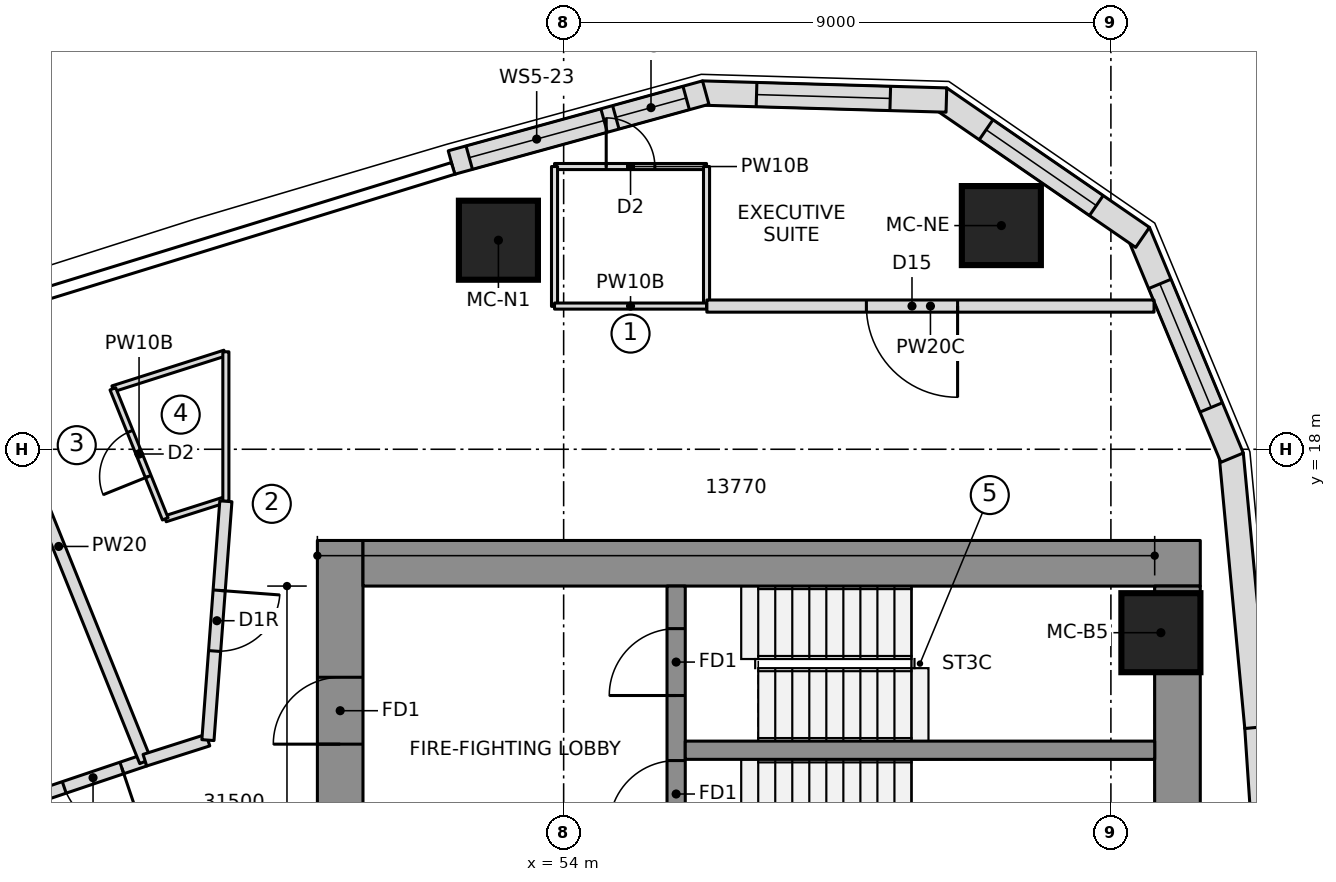
"""IFC4 building model, lengths in metres.
Left out: names, types, materials, properties, quantities, classifications, styles, units other than length and angle.
Written with IfcOpenShell. Run it as: python <this file> out.ifc"""

import sys

from ifc_helpers import new_model, si_unit, direction, frame, frame_2d, origin, origin_2d, place, context, subcontext, project, spatial, polyline, rectangle, outline, extrude, element, fill, save


model = new_model("IFC4")
c1 = context("Model", 3, precision=1e-05, world=origin(), true_north=direction((0.0, 1.0)))
c2 = subcontext(c1, "Body", "Model", "MODEL_VIEW")
j1 = project(units=[si_unit("LENGTHUNIT", "METRE"), si_unit("PLANEANGLEUNIT", "RADIAN")], contexts=[c1])
p1 = place(None, origin())
s1 = spatial("IfcSite", under=j1, at=p1, CompositionType="ELEMENT")
p2 = place(p1, origin())
s2 = spatial("IfcBuilding", under=s1, at=p2, CompositionType="ELEMENT")
p3 = place(p2, frame((0.0, 0.0, 207.45)))
s3 = spatial("IfcBuildingStorey", under=s2, at=p3, CompositionType="ELEMENT", Elevation=207.45)
p4 = place(p3, frame((50.325, 6.65, 0.0), z_axis=(0.0, 0.0, 1.0), x_axis=(0.0, 1.0, 0.0)))
e1 = element("IfcWall", 1, at=p4, inside=s3, PredefinedType="SHEAR", context=c2, shape_type="SweptSolid", body=[
    extrude(rectangle(XDim=9.85, YDim=0.75, at=frame_2d((4.925, 0.0))), origin(), (0.0, 0.0, 1.0), 3.55),
])
p5 = place(p4, frame((6.5, 0.0, 0.0)))
e2 = element("IfcOpeningElement", 2, at=p5, cuts=e1, PredefinedType="OPENING", context=c2, shape_type="SweptSolid", body=[
    extrude(rectangle(XDim=1.1, YDim=2.1, at=frame_2d((0.55, 1.05))), frame((0.0, 0.385, 0.0), z_axis=(0.0, -1.0, 0.0), x_axis=(1.0, 0.0, 0.0)), (0.0, 0.0, 1.0), 0.77),
])
p6 = place(p3, frame((50.7, 16.125, 0.0), z_axis=(0.0, 0.0, 1.0), x_axis=(1.0, 0.0, 0.0)))
e3 = element("IfcWall", 3, at=p6, inside=s3, PredefinedType="SHEAR", context=c2, shape_type="SweptSolid", body=[
    extrude(rectangle(XDim=13.77, YDim=0.75, at=frame_2d((6.885, 0.0))), origin(), (0.0, 0.0, 1.0), 3.55),
])
p7 = place(p3, frame((64.095, 8.099, 0.0), z_axis=(0.0, 0.0, 1.0), x_axis=(0.0, 1.0, 0.0)))
e4 = element("IfcWall", 4, at=p7, inside=s3, PredefinedType="SHEAR", context=c2, shape_type="SweptSolid", body=[
    extrude(rectangle(XDim=7.651, YDim=0.75, at=frame_2d((3.825, 0.0))), origin(), (0.0, 0.0, 1.0), 3.55),
])
p8 = place(p3, frame((55.85, 10.35, 0.0), z_axis=(0.0, 0.0, 1.0), x_axis=(0.0, 1.0, 0.0)))
e5 = element("IfcWall", 5, at=p8, inside=s3, PredefinedType="SHEAR", context=c2, shape_type="SweptSolid", body=[
    extrude(rectangle(XDim=5.4, YDim=0.3, at=frame_2d((2.7, 0.0))), origin(), (0.0, 0.0, 1.0), 3.55),
])
p9 = place(p8, frame((1.43, 0.0, 0.0)))
e6 = element("IfcOpeningElement", 6, at=p9, cuts=e5, PredefinedType="OPENING", context=c2, shape_type="SweptSolid", body=[
    extrude(rectangle(XDim=1.1, YDim=2.1, at=frame_2d((0.55, 1.05))), frame((0.0, 0.16, 0.0), z_axis=(0.0, -1.0, 0.0), x_axis=(1.0, 0.0, 0.0)), (0.0, 0.0, 1.0), 0.32),
])
p10 = place(p8, frame((3.6, 0.0, 0.0)))
e7 = element("IfcOpeningElement", 7, at=p10, cuts=e5, PredefinedType="OPENING", context=c2, shape_type="SweptSolid", body=[
    extrude(rectangle(XDim=1.1, YDim=2.1, at=frame_2d((0.55, 1.05))), frame((0.0, 0.16, 0.0), z_axis=(0.0, -1.0, 0.0), x_axis=(1.0, 0.0, 0.0)), (0.0, 0.0, 1.0), 0.32),
])
p11 = place(p3, frame((56.0, 13.05, 0.0), z_axis=(0.0, 0.0, 1.0), x_axis=(1.0, 0.0, 0.0)))
e8 = element("IfcWall", 8, at=p11, inside=s3, PredefinedType="SHEAR", context=c2, shape_type="SweptSolid", body=[
    extrude(rectangle(XDim=7.72, YDim=0.3, at=frame_2d((3.86, 0.0))), origin(), (0.0, 0.0, 1.0), 3.55),
])
for number, where, z_axis, x_axis in (
    (9, (63.822, 14.983, 0.0), (0.0, 0.0, 1.0), (1.0, 0.0, 0.0)),
    (10, (61.198, 21.679, 0.0), (0.0, 0.0, 1.0), (1.0, 0.0, 0.0)),
    (11, (52.927, 21.438, 0.0), (0.0, 0.0, 1.0), (1.0, 0.0, 0.0)),
):
    element("IfcColumn", number, at=place(p3, frame(where, z_axis=z_axis, x_axis=x_axis)), inside=s3, PredefinedType="COLUMN", context=c2, shape_type="SweptSolid", body=[
        extrude(rectangle(XDim=1.3, YDim=1.3, at=origin_2d()), origin(), (0.0, 0.0, 1.0), 3.55),
    ])
p12 = place(p3, frame((65.7, 8.958, 0.0), z_axis=(0.0, 0.0, 1.0), x_axis=(-0.066905935948, 0.997759287471, 0.0)))
e12 = element("IfcWall", 12, at=p12, inside=s3, PredefinedType="NOTDEFINED", context=c2, shape_type="SweptSolid", body=[
    extrude(outline(polyline([(-0.003, -0.2), (4.484, -0.2), (4.478, 0.2), (0.003, 0.2), (-0.003, -0.2)])), origin(), (0.0, 0.0, 1.0), 3.25),
])
p13 = place(p3, frame((65.401, 13.429, 0.0), z_axis=(0.0, 0.0, 1.0), x_axis=(-0.093605694738, 0.995609348044, 0.0)))
e13 = element("IfcWall", 13, at=p13, inside=s3, PredefinedType="NOTDEFINED", context=c2, shape_type="SweptSolid", body=[
    extrude(outline(polyline([(-0.003, -0.2), (4.511, -0.2), (4.451, 0.2), (0.003, 0.2), (-0.003, -0.2)])), origin(), (0.0, 0.0, 1.0), 3.25),
])
p14 = place(p3, frame((64.981, 17.89, 0.0), z_axis=(0.0, 0.0, 1.0), x_axis=(-0.383997619794, 0.923334082547, 0.0)))
e14 = element("IfcWall", 14, at=p14, inside=s3, PredefinedType="NOTDEFINED", context=c2, shape_type="SweptSolid", body=[
    extrude(outline(polyline([(-0.03, -0.2), (3.988, -0.2), (3.87, 0.2), (0.03, 0.2), (-0.03, -0.2)])), origin(), (0.0, 0.0, 1.0), 3.25),
])
p15 = place(p14, frame((0.865, 0.0, 0.6)))
e15 = element("IfcOpeningElement", 15, at=p15, cuts=e14, PredefinedType="OPENING", context=c2, shape_type="SweptSolid", body=[
    extrude(outline(polyline([(0.0, 1.35), (0.084, 1.771), (0.322, 2.128), (0.679, 2.366), (1.1, 2.45), (1.521, 2.366), (1.878, 2.128), (2.116, 1.771), (2.2, 1.35), (2.2, 1.1), (2.116, 0.679), (1.878, 0.322), (1.521, 0.084), (1.1, 0.0), (0.679, 0.084), (0.322, 0.322), (0.084, 0.679), (0.0, 1.1), (0.0, 1.35)])), frame((0.0, 0.21, 0.0), z_axis=(0.0, -1.0, 0.0), x_axis=(1.0, 0.0, 0.0)), (0.0, 0.0, 1.0), 0.42),
])
p16 = place(p3, frame((63.472, 21.518, 0.0), z_axis=(0.0, 0.0, 1.0), x_axis=(-0.823806162588, 0.566871596115, 0.0)))
e16 = element("IfcWall", 16, at=p16, inside=s3, PredefinedType="NOTDEFINED", context=c2, shape_type="SweptSolid", body=[
    extrude(outline(polyline([(-0.059, -0.2), (3.988, -0.2), (3.87, 0.2), (0.059, 0.2), (-0.059, -0.2)])), origin(), (0.0, 0.0, 1.0), 3.25),
])
p17 = place(p16, frame((0.865, 0.0, 0.6)))
e17 = element("IfcOpeningElement", 17, at=p17, cuts=e16, PredefinedType="OPENING", context=c2, shape_type="SweptSolid", body=[
    extrude(outline(polyline([(0.0, 1.35), (0.084, 1.771), (0.322, 2.128), (0.679, 2.366), (1.1, 2.45), (1.521, 2.366), (1.878, 2.128), (2.116, 1.771), (2.2, 1.35), (2.2, 1.1), (2.116, 0.679), (1.878, 0.322), (1.521, 0.084), (1.1, 0.0), (0.679, 0.084), (0.322, 0.322), (0.084, 0.679), (0.0, 1.1), (0.0, 1.35)])), frame((0.0, 0.21, 0.0), z_axis=(0.0, -1.0, 0.0), x_axis=(1.0, 0.0, 0.0)), (0.0, 0.0, 1.0), 0.42),
])
p18 = place(p3, frame((60.236, 23.745, 0.0), z_axis=(0.0, 0.0, 1.0), x_axis=(-0.999587920197, 0.028705222472, 0.0)))
e18 = element("IfcWall", 18, at=p18, inside=s3, PredefinedType="NOTDEFINED", context=c2, shape_type="SweptSolid", body=[
    extrude(outline(polyline([(-0.059, -0.2), (3.959, -0.2), (3.9, 0.2), (0.059, 0.2), (-0.059, -0.2)])), origin(), (0.0, 0.0, 1.0), 3.25),
])
p19 = place(p18, frame((0.865, 0.0, 0.6)))
e19 = element("IfcOpeningElement", 19, at=p19, cuts=e18, PredefinedType="OPENING", context=c2, shape_type="SweptSolid", body=[
    extrude(outline(polyline([(0.0, 1.35), (0.084, 1.771), (0.322, 2.128), (0.679, 2.366), (1.1, 2.45), (1.521, 2.366), (1.878, 2.128), (2.116, 1.771), (2.2, 1.35), (2.2, 1.1), (2.116, 0.679), (1.878, 0.322), (1.521, 0.084), (1.1, 0.0), (0.679, 0.084), (0.322, 0.322), (0.084, 0.679), (0.0, 1.1), (0.0, 1.35)])), frame((0.0, 0.21, 0.0), z_axis=(0.0, -1.0, 0.0), x_axis=(1.0, 0.0, 0.0)), (0.0, 0.0, 1.0), 0.42),
])
p20 = place(p3, frame((56.308, 23.858, 0.0), z_axis=(0.0, 0.0, 1.0), x_axis=(-0.964205755089, -0.265155165617, 0.0)))
e20 = element("IfcWall", 20, at=p20, inside=s3, PredefinedType="NOTDEFINED", context=c2, shape_type="SweptSolid", body=[
    extrude(outline(polyline([(-0.03, -0.2), (4.307, -0.2), (4.307, 0.2), (0.03, 0.2), (-0.03, -0.2)])), origin(), (0.0, 0.0, 1.0), 3.25),
])
p21 = place(p20, frame((0.303, 0.0, 0.9)))
e21 = element("IfcOpeningElement", 21, at=p21, cuts=e20, PredefinedType="OPENING", context=c2, shape_type="SweptSolid", body=[
    extrude(rectangle(XDim=1.2, YDim=1.8, at=frame_2d((0.6, 0.9))), frame((0.0, 0.21, 0.0), z_axis=(0.0, -1.0, 0.0), x_axis=(1.0, 0.0, 0.0)), (0.0, 0.0, 1.0), 0.42),
])
p22 = place(p20, frame((1.704, 0.0, 0.9)))
e22 = element("IfcOpeningElement", 22, at=p22, cuts=e20, PredefinedType="OPENING", context=c2, shape_type="SweptSolid", body=[
    extrude(rectangle(XDim=2.3, YDim=1.8, at=frame_2d((1.15, 0.9))), frame((0.0, 0.21, 0.0), z_axis=(0.0, -1.0, 0.0), x_axis=(1.0, 0.0, 0.0)), (0.0, 0.0, 1.0), 0.42),
])
p23 = place(p3, frame((53.85, 22.65, 0.0), z_axis=(0.0, 0.0, 1.0), x_axis=(1.0, 0.0, 0.0)))
e23 = element("IfcWall", 23, at=p23, inside=s3, PredefinedType="PARTITIONING", context=c2, shape_type="SweptSolid", body=[
    extrude(rectangle(XDim=2.5, YDim=0.1, at=frame_2d((1.25, 0.0))), origin(), (0.0, 0.0, 1.0), 3.15),
])
p24 = place(p23, frame((0.85, 0.0, 0.0)))
e24 = element("IfcOpeningElement", 24, at=p24, cuts=e23, PredefinedType="OPENING", context=c2, shape_type="SweptSolid", body=[
    extrude(rectangle(XDim=0.8, YDim=2.1, at=frame_2d((0.4, 1.05))), frame((0.0, 0.06, 0.0), z_axis=(0.0, -1.0, 0.0), x_axis=(1.0, 0.0, 0.0)), (0.0, 0.0, 1.0), 0.12),
])
for number, where, z_axis, x_axis in (
    (25, (56.35, 22.65, 0.0), (0.0, 0.0, 1.0), (0.0, -1.0, 0.0)),
    (26, (53.85, 20.35, 0.0), (0.0, 0.0, 1.0), (0.0, 1.0, 0.0)),
):
    element("IfcWall", number, at=place(p3, frame(where, z_axis=z_axis, x_axis=x_axis)), inside=s3, PredefinedType="PARTITIONING", context=c2, shape_type="SweptSolid", body=[
        extrude(rectangle(XDim=2.3, YDim=0.1, at=frame_2d((1.15, 0.0))), origin(), (0.0, 0.0, 1.0), 3.15),
    ])
p25 = place(p3, frame((47.113, 12.886, 0.0), z_axis=(0.0, 0.0, 1.0), x_axis=(-0.947550995841, -0.319604615549, 0.0)))
e27 = element("IfcWall", 27, at=p25, inside=s3, PredefinedType="PARTITIONING", context=c2, shape_type="SweptSolid", body=[
    extrude(rectangle(XDim=4.314, YDim=0.2, at=frame_2d((2.157, 0.0))), origin(), (0.0, 0.0, 1.0), 3.15),
])
p26 = place(p25, frame((0.4, 0.0, 0.0)))
e28 = element("IfcOpeningElement", 28, at=p26, cuts=e27, PredefinedType="OPENING", context=c2, shape_type="SweptSolid", body=[
    extrude(rectangle(XDim=1.0, YDim=2.1, at=frame_2d((0.5, 1.05))), frame((0.0, 0.11, 0.0), z_axis=(0.0, -1.0, 0.0), x_axis=(1.0, 0.0, 0.0)), (0.0, 0.0, 1.0), 0.22),
])
p27 = place(p3, frame((47.121, 12.867, 0.0), z_axis=(0.0, 0.0, 1.0), x_axis=(-0.373907892596, 0.92746584188, 0.0)))
e29 = element("IfcWall", 29, at=p27, inside=s3, PredefinedType="PARTITIONING", context=c2, shape_type="SweptSolid", body=[
    extrude(rectangle(XDim=7.621, YDim=0.2, at=frame_2d((3.811, 0.0))), origin(), (0.0, 0.0, 1.0), 3.15),
])
p28 = place(p3, frame((46.586, 18.994, 0.0), z_axis=(0.0, 0.0, 1.0), x_axis=(0.952696570315, 0.303923090451, 0.0)))
e30 = element("IfcWall", 30, at=p28, inside=s3, PredefinedType="PARTITIONING", context=c2, shape_type="SweptSolid", body=[
    extrude(rectangle(XDim=1.933, YDim=0.1, at=frame_2d((0.966, 0.0))), origin(), (0.0, 0.0, 1.0), 3.15),
])
p29 = place(p3, frame((48.427, 17.167, 0.0), z_axis=(0.0, 0.0, 1.0), x_axis=(-0.952763220029, -0.303714086864, 0.0)))
e31 = element("IfcWall", 31, at=p29, inside=s3, PredefinedType="PARTITIONING", context=c2, shape_type="SweptSolid", body=[
    extrude(rectangle(XDim=1.027, YDim=0.1, at=frame_2d((0.513, 0.0))), origin(), (0.0, 0.0, 1.0), 3.15),
])
p30 = place(p3, frame((47.448, 16.855, 0.0), z_axis=(0.0, 0.0, 1.0), x_axis=(-0.373817051068, 0.927502459474, 0.0)))
e32 = element("IfcWall", 32, at=p30, inside=s3, PredefinedType="PARTITIONING", context=c2, shape_type="SweptSolid", body=[
    extrude(rectangle(XDim=2.306, YDim=0.1, at=frame_2d((1.153, 0.0))), origin(), (0.0, 0.0, 1.0), 3.15),
])
p31 = place(p30, frame((0.75, 0.0, 0.0)))
e33 = element("IfcOpeningElement", 33, at=p31, cuts=e32, PredefinedType="OPENING", context=c2, shape_type="SweptSolid", body=[
    extrude(rectangle(XDim=0.8, YDim=2.1, at=frame_2d((0.4, 1.05))), frame((0.0, 0.06, 0.0), z_axis=(0.0, -1.0, 0.0), x_axis=(1.0, 0.0, 0.0)), (0.0, 0.0, 1.0), 0.12),
])
p32 = place(p3, frame((63.709, 20.355, 0.0), z_axis=(0.0, 0.0, 1.0), x_axis=(-1.0, 0.0, 0.0)))
e34 = element("IfcWall", 34, at=p32, inside=s3, PredefinedType="PARTITIONING", context=c2, shape_type="SweptSolid", body=[
    extrude(rectangle(XDim=7.354, YDim=0.2, at=frame_2d((3.677, 0.0))), origin(), (0.0, 0.0, 1.0), 3.15),
])
p33 = place(p32, frame((3.231, 0.0, 0.0)))
e35 = element("IfcOpeningElement", 35, at=p33, cuts=e34, PredefinedType="OPENING", context=c2, shape_type="SweptSolid", body=[
    extrude(rectangle(XDim=1.5, YDim=2.1, at=frame_2d((0.75, 1.05))), frame((0.0, 0.11, 0.0), z_axis=(0.0, -1.0, 0.0), x_axis=(1.0, 0.0, 0.0)), (0.0, 0.0, 1.0), 0.22),
])
p34 = place(p3, frame((56.35, 20.355, 0.0), z_axis=(0.0, 0.0, 1.0), x_axis=(-1.0, 0.0, 0.0)))
e36 = element("IfcWall", 36, at=p34, inside=s3, PredefinedType="PARTITIONING", context=c2, shape_type="SweptSolid", body=[
    extrude(rectangle(XDim=2.5, YDim=0.1, at=frame_2d((1.25, 0.0))), origin(), (0.0, 0.0, 1.0), 3.15),
])
p35 = place(p3, frame((48.445, 19.603, 0.0), z_axis=(0.0, 0.0, 1.0), x_axis=(0.0, -1.0, 0.0)))
e37 = element("IfcWall", 37, at=p35, inside=s3, PredefinedType="PARTITIONING", context=c2, shape_type="SweptSolid", body=[
    extrude(rectangle(XDim=2.459, YDim=0.1, at=frame_2d((1.229, 0.0))), origin(), (0.0, 0.0, 1.0), 3.15),
])
p36 = place(p3, frame((48.15, 13.217, 0.0), z_axis=(0.0, 0.0, 1.0), x_axis=(-0.952731090451, -0.303814860215, 0.0)))
e38 = element("IfcWall", 38, at=p36, inside=s3, PredefinedType="PARTITIONING", context=c2, shape_type="SweptSolid", body=[
    extrude(rectangle(XDim=1.088, YDim=0.2, at=frame_2d((0.544, 0.0))), origin(), (0.0, 0.0, 1.0), 3.15),
])
p37 = place(p3, frame((48.445, 17.145, 0.0), z_axis=(0.0, 0.0, 1.0), x_axis=(-0.074933243819, -0.997188552366, 0.0)))
e39 = element("IfcWall", 39, at=p37, inside=s3, PredefinedType="PARTITIONING", context=c2, shape_type="SweptSolid", body=[
    extrude(rectangle(XDim=3.939, YDim=0.2, at=frame_2d((1.969, 0.0))), origin(), (0.0, 0.0, 1.0), 3.15),
])
p38 = place(p37, frame((1.47, 0.0, 0.0)))
e40 = element("IfcOpeningElement", 40, at=p38, cuts=e39, PredefinedType="OPENING", context=c2, shape_type="SweptSolid", body=[
    extrude(rectangle(XDim=1.0, YDim=2.1, at=frame_2d((0.5, 1.05))), frame((0.0, 0.11, 0.0), z_axis=(0.0, -1.0, 0.0), x_axis=(1.0, 0.0, 0.0)), (0.0, 0.0, 1.0), 0.22),
])
p39 = place(p15, origin())
e41 = element("IfcWindow", 41, at=p39, inside=s3, PartitioningType="SINGLE_PANEL", PredefinedType="WINDOW", context=c2, shape_type="SweptSolid", body=[
    extrude(outline(polyline([(0.0, 1.35), (0.084, 1.771), (0.322, 2.128), (0.679, 2.366), (1.1, 2.45), (1.521, 2.366), (1.878, 2.128), (2.116, 1.771), (2.2, 1.35), (2.2, 1.1), (2.116, 0.679), (1.878, 0.322), (1.521, 0.084), (1.1, 0.0), (0.679, 0.084), (0.322, 0.322), (0.084, 0.679), (0.0, 1.1), (0.0, 1.35)])), frame((0.0, 0.17, 0.0), z_axis=(0.0, -1.0, 0.0), x_axis=(1.0, 0.0, 0.0)), (0.0, 0.0, 1.0), 0.06),
])
fill(e15, e41)
p40 = place(p17, origin())
e42 = element("IfcWindow", 42, at=p40, inside=s3, PartitioningType="SINGLE_PANEL", PredefinedType="WINDOW", context=c2, shape_type="SweptSolid", body=[
    extrude(outline(polyline([(0.0, 1.35), (0.084, 1.771), (0.322, 2.128), (0.679, 2.366), (1.1, 2.45), (1.521, 2.366), (1.878, 2.128), (2.116, 1.771), (2.2, 1.35), (2.2, 1.1), (2.116, 0.679), (1.878, 0.322), (1.521, 0.084), (1.1, 0.0), (0.679, 0.084), (0.322, 0.322), (0.084, 0.679), (0.0, 1.1), (0.0, 1.35)])), frame((0.0, 0.17, 0.0), z_axis=(0.0, -1.0, 0.0), x_axis=(1.0, 0.0, 0.0)), (0.0, 0.0, 1.0), 0.06),
])
fill(e17, e42)
p41 = place(p19, origin())
e43 = element("IfcWindow", 43, at=p41, inside=s3, PartitioningType="SINGLE_PANEL", PredefinedType="WINDOW", context=c2, shape_type="SweptSolid", body=[
    extrude(outline(polyline([(0.0, 1.35), (0.084, 1.771), (0.322, 2.128), (0.679, 2.366), (1.1, 2.45), (1.521, 2.366), (1.878, 2.128), (2.116, 1.771), (2.2, 1.35), (2.2, 1.1), (2.116, 0.679), (1.878, 0.322), (1.521, 0.084), (1.1, 0.0), (0.679, 0.084), (0.322, 0.322), (0.084, 0.679), (0.0, 1.1), (0.0, 1.35)])), frame((0.0, 0.17, 0.0), z_axis=(0.0, -1.0, 0.0), x_axis=(1.0, 0.0, 0.0)), (0.0, 0.0, 1.0), 0.06),
])
fill(e19, e43)
p42 = place(p21, origin())
e44 = element("IfcWindow", 44, at=p42, inside=s3, PartitioningType="SINGLE_PANEL", PredefinedType="WINDOW", context=c2, shape_type="SweptSolid", body=[
    extrude(rectangle(XDim=1.2, YDim=1.8, at=frame_2d((0.6, 0.9))), frame((0.0, 0.17, 0.0), z_axis=(0.0, -1.0, 0.0), x_axis=(1.0, 0.0, 0.0)), (0.0, 0.0, 1.0), 0.06),
])
fill(e21, e44)
p43 = place(p22, origin())
e45 = element("IfcWindow", 45, at=p43, inside=s3, PartitioningType="SINGLE_PANEL", PredefinedType="WINDOW", context=c2, shape_type="SweptSolid", body=[
    extrude(rectangle(XDim=2.3, YDim=1.8, at=frame_2d((1.15, 0.9))), frame((0.0, 0.17, 0.0), z_axis=(0.0, -1.0, 0.0), x_axis=(1.0, 0.0, 0.0)), (0.0, 0.0, 1.0), 0.06),
])
fill(e22, e45)
p44 = place(p24, origin())
e46 = element("IfcDoor", 46, at=p44, inside=s3, OperationType="SINGLE_SWING_LEFT", PredefinedType="DOOR", context=c2, shape_type="SweptSolid", body=[
    extrude(rectangle(XDim=0.8, YDim=2.1, at=frame_2d((0.4, 1.05))), frame((0.0, 0.025, 0.0), z_axis=(0.0, -1.0, 0.0), x_axis=(1.0, 0.0, 0.0)), (0.0, 0.0, 1.0), 0.05),
])
fill(e24, e46)
p45 = place(p26, origin())
e47 = element("IfcDoor", 47, at=p45, inside=s3, OperationType="SINGLE_SWING_RIGHT", PredefinedType="DOOR", context=c2, shape_type="SweptSolid", body=[
    extrude(rectangle(XDim=1.0, YDim=2.1, at=frame_2d((0.5, 1.05))), frame((0.0, 0.025, 0.0), z_axis=(0.0, -1.0, 0.0), x_axis=(1.0, 0.0, 0.0)), (0.0, 0.0, 1.0), 0.05),
])
fill(e28, e47)
p46 = place(p31, origin())
e48 = element("IfcDoor", 48, at=p46, inside=s3, OperationType="SINGLE_SWING_LEFT", PredefinedType="DOOR", context=c2, shape_type="SweptSolid", body=[
    extrude(rectangle(XDim=0.8, YDim=2.1, at=frame_2d((0.4, 1.05))), frame((0.0, 0.025, 0.0), z_axis=(0.0, -1.0, 0.0), x_axis=(1.0, 0.0, 0.0)), (0.0, 0.0, 1.0), 0.05),
])
fill(e33, e48)
p47 = place(p33, origin())
e49 = element("IfcDoor", 49, at=p47, inside=s3, OperationType="DOUBLE_DOOR_SINGLE_SWING", PredefinedType="DOOR", context=c2, shape_type="SweptSolid", body=[
    extrude(rectangle(XDim=1.5, YDim=2.1, at=frame_2d((0.75, 1.05))), frame((0.0, 0.025, 0.0), z_axis=(0.0, -1.0, 0.0), x_axis=(1.0, 0.0, 0.0)), (0.0, 0.0, 1.0), 0.05),
])
fill(e35, e49)
p48 = place(p38, origin())
e50 = element("IfcDoor", 50, at=p48, inside=s3, OperationType="SINGLE_SWING_RIGHT", PredefinedType="DOOR", context=c2, shape_type="SweptSolid", body=[
    extrude(rectangle(XDim=1.0, YDim=2.1, at=frame_2d((0.5, 1.05))), frame((0.0, 0.025, 0.0), z_axis=(0.0, -1.0, 0.0), x_axis=(1.0, 0.0, 0.0)), (0.0, 0.0, 1.0), 0.05),
])
fill(e40, e50)
p49 = place(p9, origin())
e51 = element("IfcDoor", 51, at=p49, inside=s3, OperationType="SINGLE_SWING_RIGHT", PredefinedType="DOOR", context=c2, shape_type="SweptSolid", body=[
    extrude(rectangle(XDim=1.1, YDim=2.1, at=frame_2d((0.55, 1.05))), frame((0.0, 0.025, 0.0), z_axis=(0.0, -1.0, 0.0), x_axis=(1.0, 0.0, 0.0)), (0.0, 0.0, 1.0), 0.05),
])
fill(e6, e51)
p50 = place(p10, origin())
e52 = element("IfcDoor", 52, at=p50, inside=s3, OperationType="SINGLE_SWING_RIGHT", PredefinedType="DOOR", context=c2, shape_type="SweptSolid", body=[
    extrude(rectangle(XDim=1.1, YDim=2.1, at=frame_2d((0.55, 1.05))), frame((0.0, 0.025, 0.0), z_axis=(0.0, -1.0, 0.0), x_axis=(1.0, 0.0, 0.0)), (0.0, 0.0, 1.0), 0.05),
])
fill(e7, e52)
p51 = place(p5, origin())
e53 = element("IfcDoor", 53, at=p51, inside=s3, OperationType="SINGLE_SWING_RIGHT", PredefinedType="DOOR", context=c2, shape_type="SweptSolid", body=[
    extrude(rectangle(XDim=1.1, YDim=2.1, at=frame_2d((0.55, 1.05))), frame((0.0, 0.025, 0.0), z_axis=(0.0, -1.0, 0.0), x_axis=(1.0, 0.0, 0.0)), (0.0, 0.0, 1.0), 0.05),
])
fill(e2, e53)
save(model, sys.argv[1])
